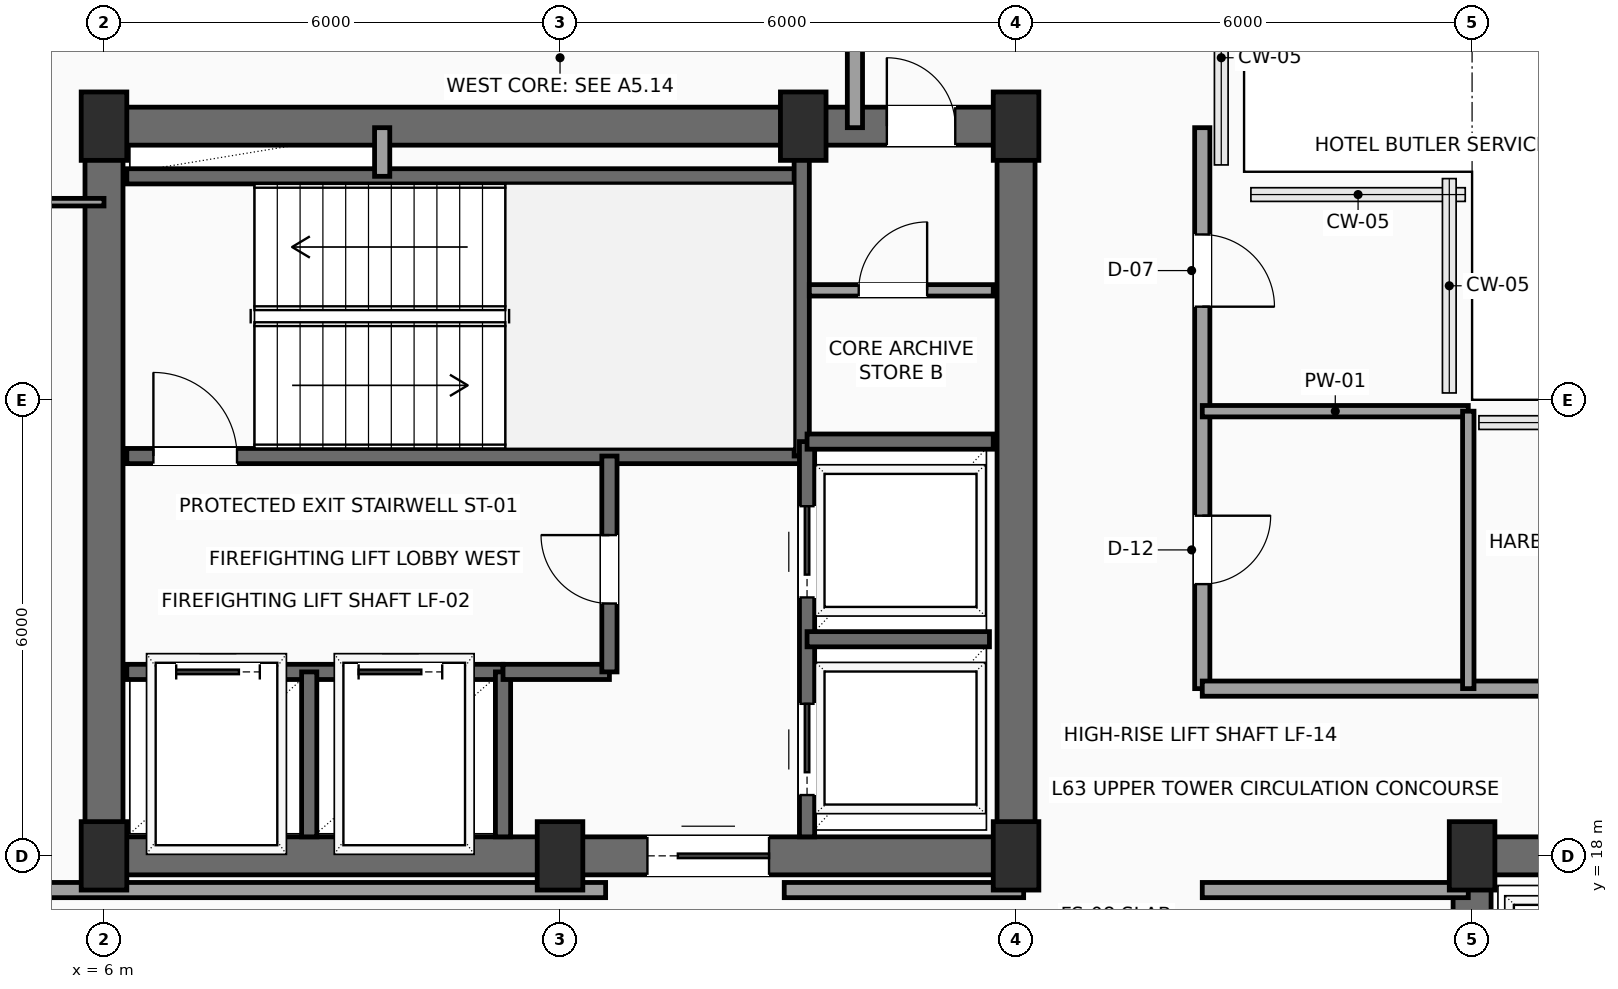
"""IFC4 building model, lengths in metres.
Left out: names, types, materials, properties, quantities, classifications, styles, units other than length and angle.
Written with IfcOpenShell. Run it as: python <this file> out.ifc"""

import sys

from ifc_helpers import new_model, si_unit, direction, frame, frame_2d, origin, origin_2d, place, context, subcontext, project, spatial, rectangle, extrude, element, fill, save


model = new_model("IFC4")
c1 = context("Model", 3, precision=1e-05, world=origin(), true_north=direction((0.0, 1.0)))
c2 = subcontext(c1, "Body", "Model", "MODEL_VIEW")
j1 = project(units=[si_unit("LENGTHUNIT", "METRE"), si_unit("PLANEANGLEUNIT", "RADIAN")], contexts=[c1])
p1 = place(None, origin())
s1 = spatial("IfcSite", under=j1, at=p1, CompositionType="ELEMENT")
p2 = place(p1, origin())
s2 = spatial("IfcBuilding", under=s1, at=p2, CompositionType="ELEMENT")
p3 = place(p2, frame((0.0, 0.0, 253.7)))
s3 = spatial("IfcBuildingStorey", under=s2, at=p3, CompositionType="ELEMENT", Elevation=253.7)
for number, where, z_axis, x_axis in (
    (1, (6.0, 18.0, 0.0), (0.0, 0.0, 1.0), (1.0, 0.0, 0.0)),
    (2, (12.0, 18.0, 0.0), (0.0, 0.0, 1.0), (1.0, 0.0, 0.0)),
    (3, (18.0, 18.0, 0.0), (0.0, 0.0, 1.0), (1.0, 0.0, 0.0)),
    (4, (6.0, 27.6, 0.0), (0.0, 0.0, 1.0), (1.0, 0.0, 0.0)),
    (5, (15.2, 27.6, 0.0), (0.0, 0.0, 1.0), (1.0, 0.0, 0.0)),
    (6, (18.0, 27.6, 0.0), (0.0, 0.0, 1.0), (1.0, 0.0, 0.0)),
    (7, (24.0, 18.0, 0.0), (0.0, 0.0, 1.0), (1.0, 0.0, 0.0)),
):
    element("IfcColumn", number, at=place(p3, frame(where, z_axis=z_axis, x_axis=x_axis)), inside=s3, PredefinedType="COLUMN", context=c2, shape_type="SweptSolid", body=[
        extrude(rectangle(XDim=0.6, YDim=0.9, at=origin_2d()), origin(), (0.0, 0.0, 1.0), 3.5),
    ])
p4 = place(p3, frame((6.0, 18.0, 0.0), z_axis=(0.0, 0.0, 1.0), x_axis=(1.0, 0.0, 0.0)))
e8 = element("IfcWall", 8, at=p4, inside=s3, PredefinedType="SHEAR", context=c2, shape_type="SweptSolid", body=[
    extrude(rectangle(XDim=12.0, YDim=0.5, at=frame_2d((6.0, 0.0))), origin(), (0.0, 0.0, 1.0), 3.3),
])
p5 = place(p4, frame((7.15, 0.0, 0.0)))
e9 = element("IfcOpeningElement", 9, at=p5, cuts=e8, PredefinedType="OPENING", context=c2, shape_type="SweptSolid", body=[
    extrude(rectangle(XDim=1.6, YDim=2.3, at=frame_2d((0.8, 1.15))), frame((0.0, 0.26, 0.0), z_axis=(0.0, -1.0, 0.0), x_axis=(1.0, 0.0, 0.0)), (0.0, 0.0, 1.0), 0.52),
])
p6 = place(p3, frame((6.0, 27.6, 0.0), z_axis=(0.0, 0.0, 1.0), x_axis=(1.0, 0.0, 0.0)))
e10 = element("IfcWall", 10, at=p6, inside=s3, PredefinedType="SHEAR", context=c2, shape_type="SweptSolid", body=[
    extrude(rectangle(XDim=12.0, YDim=0.5, at=frame_2d((6.0, 0.0))), origin(), (0.0, 0.0, 1.0), 3.3),
])
p7 = place(p6, frame((10.3, 0.0, 0.0)))
e11 = element("IfcOpeningElement", 11, at=p7, cuts=e10, PredefinedType="OPENING", context=c2, shape_type="SweptSolid", body=[
    extrude(rectangle(XDim=0.9, YDim=2.15, at=frame_2d((0.45, 1.075))), frame((0.0, 0.26, 0.0), z_axis=(0.0, -1.0, 0.0), x_axis=(1.0, 0.0, 0.0)), (0.0, 0.0, 1.0), 0.52),
])
for number, where, z_axis, x_axis in (
    (12, (6.0, 18.0, 0.0), (0.0, 0.0, 1.0), (0.0, 1.0, 0.0)),
    (13, (18.0, 18.0, 0.0), (0.0, 0.0, 1.0), (0.0, 1.0, 0.0)),
    (14, (24.0, 18.0, 0.0), (0.0, 0.0, 1.0), (1.0, 0.0, 0.0)),
):
    element("IfcWall", number, at=place(p3, frame(where, z_axis=z_axis, x_axis=x_axis)), inside=s3, PredefinedType="SHEAR", context=c2, shape_type="SweptSolid", body=[
        extrude(rectangle(XDim=9.6, YDim=0.5, at=frame_2d((4.8, 0.0))), origin(), (0.0, 0.0, 1.0), 3.3),
    ])
p8 = place(p3, frame((24.0, 6.0, 0.0), z_axis=(0.0, 0.0, 1.0), x_axis=(0.0, 1.0, 0.0)))
e15 = element("IfcWall", 15, at=p8, inside=s3, PredefinedType="SHEAR", context=c2, shape_type="SweptSolid", body=[
    extrude(rectangle(XDim=12.0, YDim=0.5, at=frame_2d((6.0, 0.0))), origin(), (0.0, 0.0, 1.0), 3.3),
])
p9 = place(p8, frame((7.15, 0.0, 0.0)))
e16 = element("IfcOpeningElement", 16, at=p9, cuts=e15, PredefinedType="OPENING", context=c2, shape_type="SweptSolid", body=[
    extrude(rectangle(XDim=1.6, YDim=2.3, at=frame_2d((0.8, 1.15))), frame((0.0, 0.26, 0.0), z_axis=(0.0, -1.0, 0.0), x_axis=(1.0, 0.0, 0.0)), (0.0, 0.0, 1.0), 0.52),
])
p10 = place(p3, frame((6.3, 23.26, 0.0), z_axis=(0.0, 0.0, 1.0), x_axis=(1.0, 0.0, 0.0)))
e17 = element("IfcWall", 17, at=p10, inside=s3, PredefinedType="SHEAR", context=c2, shape_type="SweptSolid", body=[
    extrude(rectangle(XDim=8.88, YDim=0.2, at=frame_2d((4.44, 0.0))), origin(), (0.0, 0.0, 1.0), 3.3),
])
p11 = place(p10, frame((0.35, 0.0, 0.0)))
e18 = element("IfcOpeningElement", 18, at=p11, cuts=e17, PredefinedType="OPENING", context=c2, shape_type="SweptSolid", body=[
    extrude(rectangle(XDim=1.1, YDim=2.2, at=frame_2d((0.55, 1.1))), frame((0.0, 0.11, 0.0), z_axis=(0.0, -1.0, 0.0), x_axis=(1.0, 0.0, 0.0)), (0.0, 0.0, 1.0), 0.22),
])
p12 = place(p3, frame((6.3, 26.94, 0.0), z_axis=(0.0, 0.0, 1.0), x_axis=(1.0, 0.0, 0.0)))
e19 = element("IfcWall", 19, at=p12, inside=s3, PredefinedType="SHEAR", context=c2, shape_type="SweptSolid", body=[
    extrude(rectangle(XDim=8.88, YDim=0.2, at=frame_2d((4.44, 0.0))), origin(), (0.0, 0.0, 1.0), 3.3),
])
p13 = place(p3, frame((15.18, 23.26, 0.0), z_axis=(0.0, 0.0, 1.0), x_axis=(0.0, 1.0, 0.0)))
e20 = element("IfcWall", 20, at=p13, inside=s3, PredefinedType="SHEAR", context=c2, shape_type="SweptSolid", body=[
    extrude(rectangle(XDim=4.04, YDim=0.2, at=frame_2d((2.02, 0.0))), origin(), (0.0, 0.0, 1.0), 3.3),
])
p14 = place(p3, frame((6.3, 20.42, 0.0), z_axis=(0.0, 0.0, 1.0), x_axis=(1.0, 0.0, 0.0)))
e21 = element("IfcWall", 21, at=p14, inside=s3, PredefinedType="SHEAR", context=c2, shape_type="SweptSolid", body=[
    extrude(rectangle(XDim=4.95, YDim=0.2, at=frame_2d((2.475, 0.0))), origin(), (0.0, 0.0, 1.0), 3.3),
])
p15 = place(p14, frame((0.65, 0.0, 0.0)))
e22 = element("IfcOpeningElement", 22, at=p15, cuts=e21, PredefinedType="OPENING", context=c2, shape_type="SweptSolid", body=[
    extrude(rectangle(XDim=1.1, YDim=2.2, at=frame_2d((0.55, 1.1))), frame((0.0, 0.11, 0.0), z_axis=(0.0, -1.0, 0.0), x_axis=(1.0, 0.0, 0.0)), (0.0, 0.0, 1.0), 0.22),
])
p16 = place(p14, frame((3.05, 0.0, 0.0)))
e23 = element("IfcOpeningElement", 23, at=p16, cuts=e21, PredefinedType="OPENING", context=c2, shape_type="SweptSolid", body=[
    extrude(rectangle(XDim=1.1, YDim=2.2, at=frame_2d((0.55, 1.1))), frame((0.0, 0.11, 0.0), z_axis=(0.0, -1.0, 0.0), x_axis=(1.0, 0.0, 0.0)), (0.0, 0.0, 1.0), 0.22),
])
for number, where, z_axis, x_axis in (
    (24, (8.7, 18.25, 0.0), (0.0, 0.0, 1.0), (0.0, 1.0, 0.0)),
    (25, (11.25, 18.25, 0.0), (0.0, 0.0, 1.0), (0.0, 1.0, 0.0)),
):
    element("IfcWall", number, at=place(p3, frame(where, z_axis=z_axis, x_axis=x_axis)), inside=s3, PredefinedType="SHEAR", context=c2, shape_type="SweptSolid", body=[
        extrude(rectangle(XDim=2.17, YDim=0.2, at=frame_2d((1.085, 0.0))), origin(), (0.0, 0.0, 1.0), 3.3),
    ])
p17 = place(p3, frame((11.25, 20.42, 0.0), z_axis=(0.0, 0.0, 1.0), x_axis=(1.0, 0.0, 0.0)))
e26 = element("IfcWall", 26, at=p17, inside=s3, PredefinedType="SHEAR", context=c2, shape_type="SweptSolid", body=[
    extrude(rectangle(XDim=1.4, YDim=0.2, at=frame_2d((0.7, 0.0))), origin(), (0.0, 0.0, 1.0), 3.3),
])
p18 = place(p3, frame((12.65, 20.42, 0.0), z_axis=(0.0, 0.0, 1.0), x_axis=(0.0, 1.0, 0.0)))
e27 = element("IfcWall", 27, at=p18, inside=s3, PredefinedType="SHEAR", context=c2, shape_type="SweptSolid", body=[
    extrude(rectangle(XDim=2.84, YDim=0.2, at=frame_2d((1.42, 0.0))), origin(), (0.0, 0.0, 1.0), 3.3),
])
p19 = place(p18, frame((0.9, 0.0, 0.0)))
e28 = element("IfcOpeningElement", 28, at=p19, cuts=e27, PredefinedType="OPENING", context=c2, shape_type="SweptSolid", body=[
    extrude(rectangle(XDim=0.9, YDim=2.15, at=frame_2d((0.45, 1.075))), frame((0.0, 0.11, 0.0), z_axis=(0.0, -1.0, 0.0), x_axis=(1.0, 0.0, 0.0)), (0.0, 0.0, 1.0), 0.22),
])
p20 = place(p3, frame((9.66, 26.94, 0.0), z_axis=(0.0, 0.0, 1.0), x_axis=(0.0, 1.0, 0.0)))
e29 = element("IfcWall", 29, at=p20, inside=s3, PredefinedType="SOLIDWALL", context=c2, shape_type="SweptSolid", body=[
    extrude(rectangle(XDim=0.64, YDim=0.2, at=frame_2d((0.32, 0.0))), origin(), (0.0, 0.0, 1.0), 3.3),
])
p21 = place(p3, frame((15.25, 18.25, 0.0), z_axis=(0.0, 0.0, 1.0), x_axis=(0.0, 1.0, 0.0)))
e30 = element("IfcWall", 30, at=p21, inside=s3, PredefinedType="SHEAR", context=c2, shape_type="SweptSolid", body=[
    extrude(rectangle(XDim=5.2, YDim=0.2, at=frame_2d((2.6, 0.0))), origin(), (0.0, 0.0, 1.0), 3.3),
])
p22 = place(p21, frame((0.55, 0.0, 0.0)))
e31 = element("IfcOpeningElement", 31, at=p22, cuts=e30, PredefinedType="OPENING", context=c2, shape_type="SweptSolid", body=[
    extrude(rectangle(XDim=1.2, YDim=2.2, at=frame_2d((0.6, 1.1))), frame((0.0, 0.11, 0.0), z_axis=(0.0, -1.0, 0.0), x_axis=(1.0, 0.0, 0.0)), (0.0, 0.0, 1.0), 0.22),
])
p23 = place(p21, frame((3.15, 0.0, 0.0)))
e32 = element("IfcOpeningElement", 32, at=p23, cuts=e30, PredefinedType="OPENING", context=c2, shape_type="SweptSolid", body=[
    extrude(rectangle(XDim=1.2, YDim=2.2, at=frame_2d((0.6, 1.1))), frame((0.0, 0.11, 0.0), z_axis=(0.0, -1.0, 0.0), x_axis=(1.0, 0.0, 0.0)), (0.0, 0.0, 1.0), 0.22),
])
p24 = place(p3, frame((15.25, 20.85, 0.0), z_axis=(0.0, 0.0, 1.0), x_axis=(1.0, 0.0, 0.0)))
e33 = element("IfcWall", 33, at=p24, inside=s3, PredefinedType="SHEAR", context=c2, shape_type="SweptSolid", body=[
    extrude(rectangle(XDim=2.4, YDim=0.2, at=frame_2d((1.2, 0.0))), origin(), (0.0, 0.0, 1.0), 3.3),
])
p25 = place(p3, frame((15.25, 23.45, 0.0), z_axis=(0.0, 0.0, 1.0), x_axis=(1.0, 0.0, 0.0)))
e34 = element("IfcWall", 34, at=p25, inside=s3, PredefinedType="SHEAR", context=c2, shape_type="SweptSolid", body=[
    extrude(rectangle(XDim=2.45, YDim=0.2, at=frame_2d((1.225, 0.0))), origin(), (0.0, 0.0, 1.0), 3.3),
])
p26 = place(p3, frame((15.28, 25.44, 0.0), z_axis=(0.0, 0.0, 1.0), x_axis=(1.0, 0.0, 0.0)))
e35 = element("IfcWall", 35, at=p26, inside=s3, PredefinedType="PARTITIONING", context=c2, shape_type="SweptSolid", body=[
    extrude(rectangle(XDim=2.42, YDim=0.15, at=frame_2d((1.21, 0.0))), origin(), (0.0, 0.0, 1.0), 3.3),
])
p27 = place(p26, frame((0.65, 0.0, 0.0)))
e36 = element("IfcOpeningElement", 36, at=p27, cuts=e35, PredefinedType="OPENING", context=c2, shape_type="SweptSolid", body=[
    extrude(rectangle(XDim=0.9, YDim=2.15, at=frame_2d((0.45, 1.075))), frame((0.0, 0.085, 0.0), z_axis=(0.0, -1.0, 0.0), x_axis=(1.0, 0.0, 0.0)), (0.0, 0.0, 1.0), 0.17),
])
p28 = place(p3, frame((0.3, 17.55, 0.0), z_axis=(0.0, 0.0, 1.0), x_axis=(1.0, 0.0, 0.0)))
e37 = element("IfcWall", 37, at=p28, inside=s3, PredefinedType="SOLIDWALL", context=c2, shape_type="SweptSolid", body=[
    extrude(rectangle(XDim=12.3, YDim=0.2, at=frame_2d((6.15, 0.0))), origin(), (0.0, 0.0, 1.0), 3.3),
])
p29 = place(p28, frame((1.025, 0.0, 0.0)))
e38 = element("IfcOpeningElement", 38, at=p29, cuts=e37, PredefinedType="OPENING", context=c2, shape_type="SweptSolid", body=[
    extrude(rectangle(XDim=0.9, YDim=2.1, at=frame_2d((0.45, 1.05))), frame((0.0, 0.11, 0.0), z_axis=(0.0, -1.0, 0.0), x_axis=(1.0, 0.0, 0.0)), (0.0, 0.0, 1.0), 0.22),
])
p30 = place(p28, frame((3.85, 0.0, 0.0)))
e39 = element("IfcOpeningElement", 39, at=p30, cuts=e37, PredefinedType="OPENING", context=c2, shape_type="SweptSolid", body=[
    extrude(rectangle(XDim=0.9, YDim=2.1, at=frame_2d((0.45, 1.05))), frame((0.0, 0.11, 0.0), z_axis=(0.0, -1.0, 0.0), x_axis=(1.0, 0.0, 0.0)), (0.0, 0.0, 1.0), 0.22),
])
p31 = place(p3, frame((14.95, 17.55, 0.0), z_axis=(0.0, 0.0, 1.0), x_axis=(1.0, 0.0, 0.0)))
e40 = element("IfcWall", 40, at=p31, inside=s3, PredefinedType="SOLIDWALL", context=c2, shape_type="SweptSolid", body=[
    extrude(rectangle(XDim=3.15, YDim=0.2, at=frame_2d((1.575, 0.0))), origin(), (0.0, 0.0, 1.0), 3.3),
])
p32 = place(p3, frame((15.88, 27.58, 0.0), z_axis=(0.0, 0.0, 1.0), x_axis=(0.0, 1.0, 0.0)))
e41 = element("IfcWall", 41, at=p32, inside=s3, PredefinedType="SOLIDWALL", context=c2, shape_type="SweptSolid", body=[
    extrude(rectangle(XDim=2.12, YDim=0.2, at=frame_2d((1.06, 0.0))), origin(), (0.0, 0.0, 1.0), 3.3),
])
p33 = place(p3, frame((20.45, 27.58, 0.0), z_axis=(0.0, 0.0, 1.0), x_axis=(0.0, -1.0, 0.0)))
e42 = element("IfcWall", 42, at=p33, inside=s3, PredefinedType="SOLIDWALL", context=c2, shape_type="SweptSolid", body=[
    extrude(rectangle(XDim=7.38, YDim=0.2, at=frame_2d((3.69, 0.0))), origin(), (0.0, 0.0, 1.0), 3.3),
])
p34 = place(p33, frame((5.105, 0.0, 0.0)))
e43 = element("IfcOpeningElement", 43, at=p34, cuts=e42, PredefinedType="OPENING", context=c2, shape_type="SweptSolid", body=[
    extrude(rectangle(XDim=0.9, YDim=2.1, at=frame_2d((0.45, 1.05))), frame((0.0, 0.11, 0.0), z_axis=(0.0, -1.0, 0.0), x_axis=(1.0, 0.0, 0.0)), (0.0, 0.0, 1.0), 0.22),
])
p35 = place(p33, frame((1.405, 0.0, 0.0)))
e44 = element("IfcOpeningElement", 44, at=p35, cuts=e42, PredefinedType="OPENING", context=c2, shape_type="SweptSolid", body=[
    extrude(rectangle(XDim=0.95, YDim=2.15, at=frame_2d((0.475, 1.075))), frame((0.0, 0.11, 0.0), z_axis=(0.0, -1.0, 0.0), x_axis=(1.0, 0.0, 0.0)), (0.0, 0.0, 1.0), 0.22),
])
p36 = place(p3, frame((20.45, 20.2, 0.0), z_axis=(0.0, 0.0, 1.0), x_axis=(1.0, 0.0, 0.0)))
e45 = element("IfcWall", 45, at=p36, inside=s3, PredefinedType="SOLIDWALL", context=c2, shape_type="SweptSolid", body=[
    extrude(rectangle(XDim=13.13, YDim=0.2, at=frame_2d((6.565, 0.0))), origin(), (0.0, 0.0, 1.0), 3.3),
])
p37 = place(p36, frame((7.9, 0.0, 0.0)))
e46 = element("IfcOpeningElement", 46, at=p37, cuts=e45, PredefinedType="OPENING", context=c2, shape_type="SweptSolid", body=[
    extrude(rectangle(XDim=0.9, YDim=2.1, at=frame_2d((0.45, 1.05))), frame((0.0, 0.11, 0.0), z_axis=(0.0, -1.0, 0.0), x_axis=(1.0, 0.0, 0.0)), (0.0, 0.0, 1.0), 0.22),
])
p38 = place(p3, frame((20.45, 17.55, 0.0), z_axis=(0.0, 0.0, 1.0), x_axis=(1.0, 0.0, 0.0)))
e47 = element("IfcWall", 47, at=p38, inside=s3, PredefinedType="SOLIDWALL", context=c2, shape_type="SweptSolid", body=[
    extrude(rectangle(XDim=3.5, YDim=0.2, at=frame_2d((1.75, 0.0))), origin(), (0.0, 0.0, 1.0), 3.3),
])
p39 = place(p3, frame((20.45, 23.85, 0.0), z_axis=(0.0, 0.0, 1.0), x_axis=(1.0, 0.0, 0.0)))
e48 = element("IfcWall", 48, at=p39, inside=s3, PredefinedType="PARTITIONING", context=c2, shape_type="SweptSolid", body=[
    extrude(rectangle(XDim=3.5, YDim=0.15, at=frame_2d((1.75, 0.0))), origin(), (0.0, 0.0, 1.0), 3.3),
])
p40 = place(p3, frame((23.95, 20.2, 0.0), z_axis=(0.0, 0.0, 1.0), x_axis=(0.0, 1.0, 0.0)))
e49 = element("IfcWall", 49, at=p40, inside=s3, PredefinedType="PARTITIONING", context=c2, shape_type="SweptSolid", body=[
    extrude(rectangle(XDim=3.65, YDim=0.15, at=frame_2d((1.825, 0.0))), origin(), (0.0, 0.0, 1.0), 3.3),
])
p41 = place(p3, frame((3.2, 26.6, 0.0), z_axis=(0.0, 0.0, 1.0), x_axis=(1.0, 0.0, 0.0)))
e50 = element("IfcWall", 50, at=p41, inside=s3, PredefinedType="PARTITIONING", context=c2, shape_type="SweptSolid", body=[
    extrude(rectangle(XDim=2.8, YDim=0.1, at=frame_2d((1.4, 0.0))), origin(), (0.0, 0.0, 1.0), 3.3),
])
p42 = place(p5, origin())
e51 = element("IfcDoor", 51, at=p42, inside=s3, OperationType="DOUBLE_DOOR_SLIDING", PredefinedType="DOOR", context=c2, shape_type="SweptSolid", body=[
    extrude(rectangle(XDim=1.6, YDim=2.3, at=frame_2d((0.8, 1.15))), frame((0.0, 0.025, 0.0), z_axis=(0.0, -1.0, 0.0), x_axis=(1.0, 0.0, 0.0)), (0.0, 0.0, 1.0), 0.05),
])
fill(e9, e51)
p43 = place(p7, origin())
e52 = element("IfcDoor", 52, at=p43, inside=s3, OperationType="SINGLE_SWING_LEFT", PredefinedType="DOOR", context=c2, shape_type="SweptSolid", body=[
    extrude(rectangle(XDim=0.9, YDim=2.15, at=frame_2d((0.45, 1.075))), frame((0.0, 0.025, 0.0), z_axis=(0.0, -1.0, 0.0), x_axis=(1.0, 0.0, 0.0)), (0.0, 0.0, 1.0), 0.05),
])
fill(e11, e52)
p44 = place(p11, origin())
e53 = element("IfcDoor", 53, at=p44, inside=s3, OperationType="SINGLE_SWING_LEFT", PredefinedType="DOOR", context=c2, shape_type="SweptSolid", body=[
    extrude(rectangle(XDim=1.1, YDim=2.2, at=frame_2d((0.55, 1.1))), frame((0.0, 0.025, 0.0), z_axis=(0.0, -1.0, 0.0), x_axis=(1.0, 0.0, 0.0)), (0.0, 0.0, 1.0), 0.05),
])
fill(e18, e53)
p45 = place(p15, origin())
e54 = element("IfcDoor", 54, at=p45, inside=s3, OperationType="SLIDING_TO_LEFT", PredefinedType="DOOR", context=c2, shape_type="SweptSolid", body=[
    extrude(rectangle(XDim=1.1, YDim=2.2, at=frame_2d((0.55, 1.1))), frame((0.0, 0.025, 0.0), z_axis=(0.0, -1.0, 0.0), x_axis=(1.0, 0.0, 0.0)), (0.0, 0.0, 1.0), 0.05),
])
fill(e22, e54)
p46 = place(p16, origin())
e55 = element("IfcDoor", 55, at=p46, inside=s3, OperationType="SLIDING_TO_LEFT", PredefinedType="DOOR", context=c2, shape_type="SweptSolid", body=[
    extrude(rectangle(XDim=1.1, YDim=2.2, at=frame_2d((0.55, 1.1))), frame((0.0, 0.025, 0.0), z_axis=(0.0, -1.0, 0.0), x_axis=(1.0, 0.0, 0.0)), (0.0, 0.0, 1.0), 0.05),
])
fill(e23, e55)
p47 = place(p19, origin())
e56 = element("IfcDoor", 56, at=p47, inside=s3, OperationType="SINGLE_SWING_RIGHT", PredefinedType="DOOR", context=c2, shape_type="SweptSolid", body=[
    extrude(rectangle(XDim=0.9, YDim=2.15, at=frame_2d((0.45, 1.075))), frame((0.0, 0.025, 0.0), z_axis=(0.0, -1.0, 0.0), x_axis=(1.0, 0.0, 0.0)), (0.0, 0.0, 1.0), 0.05),
])
fill(e28, e56)
p48 = place(p22, origin())
e57 = element("IfcDoor", 57, at=p48, inside=s3, OperationType="SLIDING_TO_RIGHT", PredefinedType="DOOR", context=c2, shape_type="SweptSolid", body=[
    extrude(rectangle(XDim=1.2, YDim=2.2, at=frame_2d((0.6, 1.1))), frame((0.0, 0.025, 0.0), z_axis=(0.0, -1.0, 0.0), x_axis=(1.0, 0.0, 0.0)), (0.0, 0.0, 1.0), 0.05),
])
fill(e31, e57)
p49 = place(p23, origin())
e58 = element("IfcDoor", 58, at=p49, inside=s3, OperationType="SLIDING_TO_RIGHT", PredefinedType="DOOR", context=c2, shape_type="SweptSolid", body=[
    extrude(rectangle(XDim=1.2, YDim=2.2, at=frame_2d((0.6, 1.1))), frame((0.0, 0.025, 0.0), z_axis=(0.0, -1.0, 0.0), x_axis=(1.0, 0.0, 0.0)), (0.0, 0.0, 1.0), 0.05),
])
fill(e32, e58)
p50 = place(p27, origin())
e59 = element("IfcDoor", 59, at=p50, inside=s3, OperationType="SINGLE_SWING_RIGHT", PredefinedType="DOOR", context=c2, shape_type="SweptSolid", body=[
    extrude(rectangle(XDim=0.9, YDim=2.15, at=frame_2d((0.45, 1.075))), frame((0.0, 0.025, 0.0), z_axis=(0.0, -1.0, 0.0), x_axis=(1.0, 0.0, 0.0)), (0.0, 0.0, 1.0), 0.05),
])
fill(e36, e59)
p51 = place(p34, origin())
e60 = element("IfcDoor", 60, at=p51, inside=s3, OperationType="SINGLE_SWING_LEFT", PredefinedType="DOOR", context=c2, shape_type="SweptSolid", body=[
    extrude(rectangle(XDim=0.9, YDim=2.1, at=frame_2d((0.45, 1.05))), frame((0.0, 0.025, 0.0), z_axis=(0.0, -1.0, 0.0), x_axis=(1.0, 0.0, 0.0)), (0.0, 0.0, 1.0), 0.05),
])
fill(e43, e60)
p52 = place(p35, origin())
e61 = element("IfcDoor", 61, at=p52, inside=s3, OperationType="SINGLE_SWING_RIGHT", PredefinedType="DOOR", context=c2, shape_type="SweptSolid", body=[
    extrude(rectangle(XDim=0.95, YDim=2.15, at=frame_2d((0.475, 1.075))), frame((0.0, 0.025, 0.0), z_axis=(0.0, -1.0, 0.0), x_axis=(1.0, 0.0, 0.0)), (0.0, 0.0, 1.0), 0.05),
])
fill(e44, e61)
save(model, sys.argv[1])
